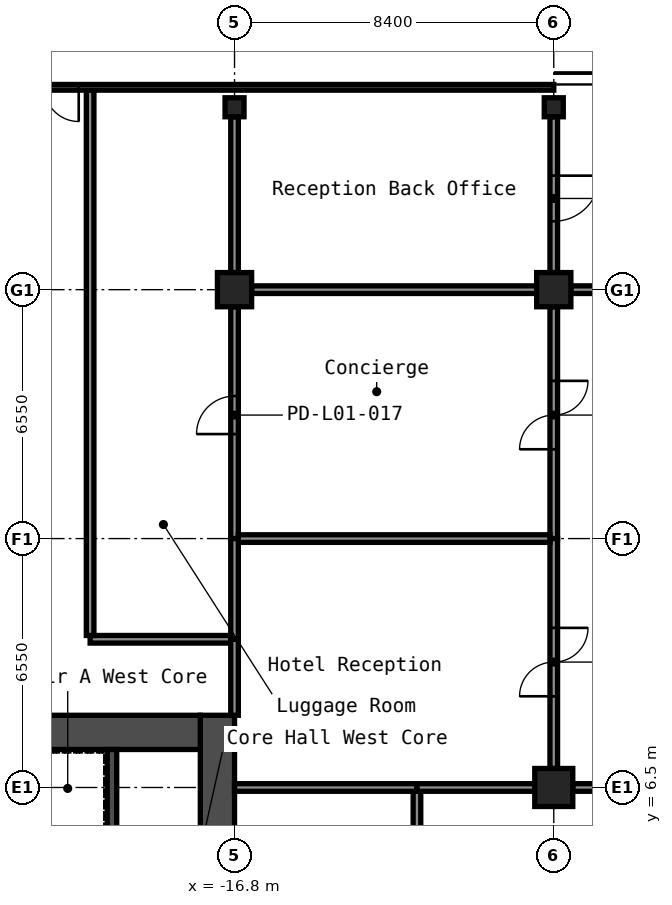
"""IFC4 building model, lengths in metres.
Left out: names, types, materials, properties, quantities, classifications, styles, units other than length and angle.
Written with IfcOpenShell. Run it as: python <this file> out.ifc"""

import sys

from ifc_helpers import new_model, si_unit, direction, frame, frame_2d, origin, origin_2d, place, context, subcontext, project, spatial, rectangle, hollow_rectangle, extrude, element, fill, save


model = new_model("IFC4")
c1 = context("Model", 3, precision=1e-05, world=origin(), true_north=direction((0.0, 1.0)))
c2 = subcontext(c1, "Body", "Model", "MODEL_VIEW")
j1 = project(units=[si_unit("LENGTHUNIT", "METRE"), si_unit("PLANEANGLEUNIT", "RADIAN")], contexts=[c1])
p1 = place(None, origin())
s1 = spatial("IfcSite", under=j1, at=p1, CompositionType="ELEMENT")
p2 = place(p1, origin())
s2 = spatial("IfcBuilding", under=s1, at=p2, CompositionType="ELEMENT")
p3 = place(p2, origin())
s3 = spatial("IfcBuildingStorey", under=s2, at=p3, CompositionType="ELEMENT", Elevation=0.0)
p4 = place(p3, frame((-16.8, 19.6, -0.3), z_axis=(0.0, 0.0, 1.0), x_axis=(1.0, 0.0, 0.0)))
e1 = element("IfcColumn", 1, at=p4, inside=s3, PredefinedType="COLUMN", context=c2, shape_type="SweptSolid", body=[
    extrude(hollow_rectangle(XDim=0.9, YDim=0.9, WallThickness=0.036, at=origin_2d()), origin(), (0.0, 0.0, 1.0), 8.9),
])
p5 = place(p3, frame((-8.4, 6.5, -0.3), z_axis=(0.0, 0.0, 1.0), x_axis=(1.0, 0.0, 0.0)))
e2 = element("IfcColumn", 2, at=p5, inside=s3, PredefinedType="COLUMN", context=c2, shape_type="SweptSolid", body=[
    extrude(hollow_rectangle(XDim=1.0, YDim=1.0, WallThickness=0.04, at=origin_2d()), origin(), (0.0, 0.0, 1.0), 8.9),
])
p6 = place(p3, frame((-8.4, 19.6, -0.3), z_axis=(0.0, 0.0, 1.0), x_axis=(1.0, 0.0, 0.0)))
e3 = element("IfcColumn", 3, at=p6, inside=s3, PredefinedType="COLUMN", context=c2, shape_type="SweptSolid", body=[
    extrude(hollow_rectangle(XDim=0.9, YDim=0.9, WallThickness=0.036, at=origin_2d()), origin(), (0.0, 0.0, 1.0), 8.9),
])
for number, where, z_axis, x_axis in (
    (4, (-16.8, 24.4, -0.3), (0.0, 0.0, 1.0), (1.0, 0.0, 0.0)),
    (5, (-8.4, 24.4, -0.3), (0.0, 0.0, 1.0), (1.0, 0.0, 0.0)),
):
    element("IfcColumn", number, at=place(p3, frame(where, z_axis=z_axis, x_axis=x_axis)), inside=s3, PredefinedType="COLUMN", context=c2, shape_type="SweptSolid", body=[
        extrude(hollow_rectangle(XDim=0.5, YDim=0.5, WallThickness=0.019, InnerFilletRadius=0.029, OuterFilletRadius=0.048, at=origin_2d()), origin(), (0.0, 0.0, 1.0), 8.9),
    ])
p7 = place(p3, frame((-17.25, -8.4, 0.0), z_axis=(0.0, 0.0, 1.0), x_axis=(0.0, 1.0, 0.0)))
e6 = element("IfcWall", 6, at=p7, inside=s3, PredefinedType="SHEAR", context=c2, shape_type="SweptSolid", body=[
    extrude(rectangle(XDim=16.8, YDim=0.9, at=frame_2d((8.4, 0.0))), origin(), (0.0, 0.0, 1.0), 8.6),
])
p8 = place(p7, frame((3.4, 0.0, 0.0)))
e7 = element("IfcOpeningElement", 7, at=p8, cuts=e6, PredefinedType="OPENING", context=c2, shape_type="SweptSolid", body=[
    extrude(rectangle(XDim=1.6, YDim=2.1, at=frame_2d((0.8, 1.05))), frame((0.0, 0.46, 0.0), z_axis=(0.0, -1.0, 0.0), x_axis=(1.0, 0.0, 0.0)), (0.0, 0.0, 1.0), 0.92),
])
p9 = place(p7, frame((9.6, 0.0, 0.0)))
e8 = element("IfcOpeningElement", 8, at=p9, cuts=e6, PredefinedType="OPENING", context=c2, shape_type="SweptSolid", body=[
    extrude(rectangle(XDim=1.6, YDim=2.1, at=frame_2d((0.8, 1.05))), frame((0.0, 0.46, 0.0), z_axis=(0.0, -1.0, 0.0), x_axis=(1.0, 0.0, 0.0)), (0.0, 0.0, 1.0), 0.92),
])
p10 = place(p7, frame((11.8, 0.0, 0.0)))
e9 = element("IfcOpeningElement", 9, at=p10, cuts=e6, PredefinedType="OPENING", context=c2, shape_type="SweptSolid", body=[
    extrude(rectangle(XDim=1.6, YDim=2.1, at=frame_2d((0.8, 1.05))), frame((0.0, 0.46, 0.0), z_axis=(0.0, -1.0, 0.0), x_axis=(1.0, 0.0, 0.0)), (0.0, 0.0, 1.0), 0.92),
])
p11 = place(p3, frame((-32.7, 7.95, 0.0), z_axis=(0.0, 0.0, 1.0), x_axis=(1.0, 0.0, 0.0)))
e10 = element("IfcWall", 10, at=p11, inside=s3, PredefinedType="SHEAR", context=c2, shape_type="SweptSolid", body=[
    extrude(rectangle(XDim=15.0, YDim=0.9, at=frame_2d((7.5, 0.0))), origin(), (0.0, 0.0, 1.0), 8.6),
])
p12 = place(p11, frame((3.4, 0.0, 0.0)))
e11 = element("IfcOpeningElement", 11, at=p12, cuts=e10, PredefinedType="OPENING", context=c2, shape_type="SweptSolid", body=[
    extrude(rectangle(XDim=1.2, YDim=2.1, at=frame_2d((0.6, 1.05))), frame((0.0, 0.46, 0.0), z_axis=(0.0, -1.0, 0.0), x_axis=(1.0, 0.0, 0.0)), (0.0, 0.0, 1.0), 0.92),
])
p13 = place(p11, frame((0.75, 0.0, 0.0)))
e12 = element("IfcOpeningElement", 12, at=p13, cuts=e10, PredefinedType="OPENING", context=c2, shape_type="SweptSolid", body=[
    extrude(rectangle(XDim=0.9, YDim=2.1, at=frame_2d((0.45, 1.05))), frame((0.0, 0.46, 0.0), z_axis=(0.0, -1.0, 0.0), x_axis=(1.0, 0.0, 0.0)), (0.0, 0.0, 1.0), 0.92),
])
p14 = place(p11, frame((7.05, 0.0, 0.0)))
e13 = element("IfcOpeningElement", 13, at=p14, cuts=e10, PredefinedType="OPENING", context=c2, shape_type="SweptSolid", body=[
    extrude(rectangle(XDim=1.2, YDim=2.1, at=frame_2d((0.6, 1.05))), frame((0.0, 0.46, 0.0), z_axis=(0.0, -1.0, 0.0), x_axis=(1.0, 0.0, 0.0)), (0.0, 0.0, 1.0), 0.92),
])
p15 = place(p3, frame((-20.025, 1.2, 0.0), z_axis=(0.0, 0.0, 1.0), x_axis=(0.0, 1.0, 0.0)))
e14 = element("IfcWall", 14, at=p15, inside=s3, PredefinedType="SHEAR", context=c2, shape_type="SweptSolid", body=[
    extrude(rectangle(XDim=6.3, YDim=0.25, at=frame_2d((3.15, 0.0))), origin(), (0.0, 0.0, 1.0), 8.6),
])
p16 = place(p3, frame((-8.4, 20.05, 0.0), z_axis=(0.0, 0.0, 1.0), x_axis=(0.0, 1.0, 0.0)))
e15 = element("IfcWall", 15, at=p16, inside=s3, PredefinedType="PARTITIONING", context=c2, shape_type="SweptSolid", body=[
    extrude(rectangle(XDim=4.1, YDim=0.2, at=frame_2d((2.05, 0.0))), origin(), (0.0, 0.0, 1.0), 8.6),
])
p17 = place(p16, frame((1.35, 0.0, 0.0)))
e16 = element("IfcOpeningElement", 16, at=p17, cuts=e15, PredefinedType="OPENING", context=c2, shape_type="SweptSolid", body=[
    extrude(rectangle(XDim=1.2, YDim=2.1, at=frame_2d((0.6, 1.05))), frame((0.0, 0.11, 0.0), z_axis=(0.0, -1.0, 0.0), x_axis=(1.0, 0.0, 0.0)), (0.0, 0.0, 1.0), 0.22),
])
p18 = place(p3, frame((-16.8, 20.05, 0.0), z_axis=(0.0, 0.0, 1.0), x_axis=(0.0, 1.0, 0.0)))
e17 = element("IfcWall", 17, at=p18, inside=s3, PredefinedType="PARTITIONING", context=c2, shape_type="SweptSolid", body=[
    extrude(rectangle(XDim=4.1, YDim=0.2, at=frame_2d((2.05, 0.0))), origin(), (0.0, 0.0, 1.0), 8.6),
])
p19 = place(p3, frame((-16.35, 19.6, 0.0), z_axis=(0.0, 0.0, 1.0), x_axis=(1.0, 0.0, 0.0)))
e18 = element("IfcWall", 18, at=p19, inside=s3, PredefinedType="PARTITIONING", context=c2, shape_type="SweptSolid", body=[
    extrude(rectangle(XDim=7.5, YDim=0.2, at=frame_2d((3.75, 0.0))), origin(), (0.0, 0.0, 1.0), 8.6),
])
p20 = place(p3, frame((-16.8, 13.05, 0.0), z_axis=(0.0, 0.0, 1.0), x_axis=(0.0, 1.0, 0.0)))
e19 = element("IfcWall", 19, at=p20, inside=s3, PredefinedType="PARTITIONING", context=c2, shape_type="SweptSolid", body=[
    extrude(rectangle(XDim=6.1, YDim=0.2, at=frame_2d((3.05, 0.0))), origin(), (0.0, 0.0, 1.0), 8.6),
])
p21 = place(p20, frame((2.75, 0.0, 0.0)))
e20 = element("IfcOpeningElement", 20, at=p21, cuts=e19, PredefinedType="OPENING", context=c2, shape_type="SweptSolid", body=[
    extrude(rectangle(XDim=1.0, YDim=2.1, at=frame_2d((0.5, 1.05))), frame((0.0, 0.11, 0.0), z_axis=(0.0, -1.0, 0.0), x_axis=(1.0, 0.0, 0.0)), (0.0, 0.0, 1.0), 0.22),
])
p22 = place(p3, frame((-12.0, 6.4, 0.0), z_axis=(0.0, 0.0, 1.0), x_axis=(0.0, -1.0, 0.0)))
e21 = element("IfcWall", 21, at=p22, inside=s3, PredefinedType="PARTITIONING", context=c2, shape_type="SweptSolid", body=[
    extrude(rectangle(XDim=12.8, YDim=0.2, at=frame_2d((6.4, 0.0))), origin(), (0.0, 0.0, 1.0), 8.6),
])
p23 = place(p22, frame((5.2, 0.0, 0.0)))
e22 = element("IfcOpeningElement", 22, at=p23, cuts=e21, PredefinedType="OPENING", context=c2, shape_type="SweptSolid", body=[
    extrude(rectangle(XDim=2.4, YDim=2.1, at=frame_2d((1.2, 1.05))), frame((0.0, 0.11, 0.0), z_axis=(0.0, -1.0, 0.0), x_axis=(1.0, 0.0, 0.0)), (0.0, 0.0, 1.0), 0.22),
])
p24 = place(p3, frame((-16.8, 6.5, 0.0), z_axis=(0.0, 0.0, 1.0), x_axis=(1.0, 0.0, 0.0)))
e23 = element("IfcWall", 23, at=p24, inside=s3, PredefinedType="PARTITIONING", context=c2, shape_type="SweptSolid", body=[
    extrude(rectangle(XDim=4.8, YDim=0.2, at=frame_2d((2.4, 0.0))), origin(), (0.0, 0.0, 1.0), 8.6),
])
p25 = place(p3, frame((-7.9, 6.5, 0.0), z_axis=(0.0, 0.0, 1.0), x_axis=(1.0, 0.0, 0.0)))
e24 = element("IfcWall", 24, at=p25, inside=s3, PredefinedType="PARTITIONING", context=c2, shape_type="SweptSolid", body=[
    extrude(rectangle(XDim=7.4, YDim=0.2, at=frame_2d((3.7, 0.0))), origin(), (0.0, 0.0, 1.0), 8.6),
])
p26 = place(p25, frame((2.5, 0.0, 0.0)))
e25 = element("IfcOpeningElement", 25, at=p26, cuts=e24, PredefinedType="OPENING", context=c2, shape_type="SweptSolid", body=[
    extrude(rectangle(XDim=2.4, YDim=2.1, at=frame_2d((1.2, 1.05))), frame((0.0, 0.11, 0.0), z_axis=(0.0, -1.0, 0.0), x_axis=(1.0, 0.0, 0.0)), (0.0, 0.0, 1.0), 0.22),
])
p27 = place(p3, frame((-12.0, 6.5, 0.0), z_axis=(0.0, 0.0, 1.0), x_axis=(1.0, 0.0, 0.0)))
e26 = element("IfcWall", 26, at=p27, inside=s3, PredefinedType="PARTITIONING", context=c2, shape_type="SweptSolid", body=[
    extrude(rectangle(XDim=3.1, YDim=0.2, at=frame_2d((1.55, 0.0))), origin(), (0.0, 0.0, 1.0), 8.6),
])
p28 = place(p3, frame((-7.95, 19.6, 0.0), z_axis=(0.0, 0.0, 1.0), x_axis=(1.0, 0.0, 0.0)))
e27 = element("IfcWall", 27, at=p28, inside=s3, PredefinedType="PARTITIONING", context=c2, shape_type="SweptSolid", body=[
    extrude(rectangle(XDim=7.5, YDim=0.2, at=frame_2d((3.75, 0.0))), origin(), (0.0, 0.0, 1.0), 8.6),
])
p29 = place(p28, frame((2.55, 0.0, 0.0)))
e28 = element("IfcOpeningElement", 28, at=p29, cuts=e27, PredefinedType="OPENING", context=c2, shape_type="SweptSolid", body=[
    extrude(rectangle(XDim=2.4, YDim=2.1, at=frame_2d((1.2, 1.05))), frame((0.0, 0.11, 0.0), z_axis=(0.0, -1.0, 0.0), x_axis=(1.0, 0.0, 0.0)), (0.0, 0.0, 1.0), 0.22),
])
p30 = place(p3, frame((-8.4, 13.05, 0.0), z_axis=(0.0, 0.0, 1.0), x_axis=(0.0, 1.0, 0.0)))
e29 = element("IfcWall", 29, at=p30, inside=s3, PredefinedType="PARTITIONING", context=c2, shape_type="SweptSolid", body=[
    extrude(rectangle(XDim=6.1, YDim=0.2, at=frame_2d((3.05, 0.0))), origin(), (0.0, 0.0, 1.0), 8.6),
])
p31 = place(p30, frame((2.35, 0.0, 0.0)))
e30 = element("IfcOpeningElement", 30, at=p31, cuts=e29, PredefinedType="OPENING", context=c2, shape_type="SweptSolid", body=[
    extrude(rectangle(XDim=1.8, YDim=2.1, at=frame_2d((0.9, 1.05))), frame((0.0, 0.11, 0.0), z_axis=(0.0, -1.0, 0.0), x_axis=(1.0, 0.0, 0.0)), (0.0, 0.0, 1.0), 0.22),
])
p32 = place(p3, frame((-8.4, 7.0, 0.0), z_axis=(0.0, 0.0, 1.0), x_axis=(0.0, 1.0, 0.0)))
e31 = element("IfcWall", 31, at=p32, inside=s3, PredefinedType="PARTITIONING", context=c2, shape_type="SweptSolid", body=[
    extrude(rectangle(XDim=6.05, YDim=0.2, at=frame_2d((3.025, 0.0))), origin(), (0.0, 0.0, 1.0), 8.6),
])
p33 = place(p32, frame((1.9, 0.0, 0.0)))
e32 = element("IfcOpeningElement", 32, at=p33, cuts=e31, PredefinedType="OPENING", context=c2, shape_type="SweptSolid", body=[
    extrude(rectangle(XDim=1.8, YDim=2.1, at=frame_2d((0.9, 1.05))), frame((0.0, 0.11, 0.0), z_axis=(0.0, -1.0, 0.0), x_axis=(1.0, 0.0, 0.0)), (0.0, 0.0, 1.0), 0.22),
])
p34 = place(p3, frame((-16.7, 13.05, 0.0), z_axis=(0.0, 0.0, 1.0), x_axis=(1.0, 0.0, 0.0)))
e33 = element("IfcWall", 33, at=p34, inside=s3, PredefinedType="PARTITIONING", context=c2, shape_type="SweptSolid", body=[
    extrude(rectangle(XDim=8.2, YDim=0.2, at=frame_2d((4.1, 0.0))), origin(), (0.0, 0.0, 1.0), 8.6),
])
p35 = place(p3, frame((-16.8, 10.4, 0.0), z_axis=(0.0, 0.0, 1.0), x_axis=(0.0, 1.0, 0.0)))
e34 = element("IfcWall", 34, at=p35, inside=s3, PredefinedType="PARTITIONING", context=c2, shape_type="SweptSolid", body=[
    extrude(rectangle(XDim=2.65, YDim=0.2, at=frame_2d((1.325, 0.0))), origin(), (0.0, 0.0, 1.0), 8.6),
])
p36 = place(p3, frame((-20.6, 10.4, 0.0), z_axis=(0.0, 0.0, 1.0), x_axis=(1.0, 0.0, 0.0)))
e35 = element("IfcWall", 35, at=p36, inside=s3, PredefinedType="PARTITIONING", context=c2, shape_type="SweptSolid", body=[
    extrude(rectangle(XDim=3.7, YDim=0.2, at=frame_2d((1.85, 0.0))), origin(), (0.0, 0.0, 1.0), 8.6),
])
p37 = place(p3, frame((-20.6, 24.85, 0.0), z_axis=(0.0, 0.0, 1.0), x_axis=(0.0, -1.0, 0.0)))
e36 = element("IfcWall", 36, at=p37, inside=s3, PredefinedType="PARTITIONING", context=c2, shape_type="SweptSolid", body=[
    extrude(rectangle(XDim=14.35, YDim=0.2, at=frame_2d((7.175, 0.0))), origin(), (0.0, 0.0, 1.0), 8.6),
])
p38 = place(p3, frame((-16.8, 10.4, 0.0), z_axis=(0.0, 0.0, 1.0), x_axis=(0.0, -1.0, 0.0)))
e37 = element("IfcWall", 37, at=p38, inside=s3, PredefinedType="PARTITIONING", context=c2, shape_type="SweptSolid", body=[
    extrude(rectangle(XDim=2.0, YDim=0.2, at=frame_2d((1.0, 0.0))), origin(), (0.0, 0.0, 1.0), 8.6),
])
p39 = place(p3, frame((-23.6, 24.925, 0.0), z_axis=(0.0, 0.0, 1.0), x_axis=(1.0, 0.0, 0.0)))
e38 = element("IfcWall", 38, at=p39, inside=s3, PredefinedType="STANDARD", context=c2, shape_type="SweptSolid", body=[
    extrude(rectangle(XDim=15.2, YDim=0.15, at=frame_2d((7.6, 0.0))), origin(), (0.0, 0.0, 1.0), 8.6),
])
p40 = place(p39, frame((0.9, 0.0, 0.0)))
e39 = element("IfcOpeningElement", 39, at=p40, cuts=e38, PredefinedType="OPENING", context=c2, shape_type="SweptSolid", body=[
    extrude(rectangle(XDim=1.8, YDim=2.1, at=frame_2d((0.9, 1.05))), frame((0.0, 0.085, 0.0), z_axis=(0.0, -1.0, 0.0), x_axis=(1.0, 0.0, 0.0)), (0.0, 0.0, 1.0), 0.17),
])
p41 = place(p33, origin())
e40 = element("IfcDoor", 40, at=p41, inside=s3, OperationType="DOUBLE_DOOR_DOUBLE_SWING", PredefinedType="DOOR", context=c2, shape_type="SweptSolid", body=[
    extrude(rectangle(XDim=1.8, YDim=2.1, at=frame_2d((0.9, 1.05))), frame((0.0, 0.025, 0.0), z_axis=(0.0, -1.0, 0.0), x_axis=(1.0, 0.0, 0.0)), (0.0, 0.0, 1.0), 0.05),
])
fill(e32, e40)
p42 = place(p31, origin())
e41 = element("IfcDoor", 41, at=p42, inside=s3, OperationType="DOUBLE_DOOR_DOUBLE_SWING", PredefinedType="DOOR", context=c2, shape_type="SweptSolid", body=[
    extrude(rectangle(XDim=1.8, YDim=2.1, at=frame_2d((0.9, 1.05))), frame((0.0, 0.025, 0.0), z_axis=(0.0, -1.0, 0.0), x_axis=(1.0, 0.0, 0.0)), (0.0, 0.0, 1.0), 0.05),
])
fill(e30, e41)
p43 = place(p17, origin())
e42 = element("IfcDoor", 42, at=p43, inside=s3, OperationType="SINGLE_SWING_RIGHT", PredefinedType="DOOR", context=c2, shape_type="SweptSolid", body=[
    extrude(rectangle(XDim=1.2, YDim=2.1, at=frame_2d((0.6, 1.05))), frame((0.0, 0.025, 0.0), z_axis=(0.0, -1.0, 0.0), x_axis=(1.0, 0.0, 0.0)), (0.0, 0.0, 1.0), 0.05),
])
fill(e16, e42)
p44 = place(p21, origin())
e43 = element("IfcDoor", 43, at=p44, inside=s3, OperationType="SINGLE_SWING_RIGHT", PredefinedType="DOOR", context=c2, shape_type="SweptSolid", body=[
    extrude(rectangle(XDim=1.0, YDim=2.1, at=frame_2d((0.5, 1.05))), frame((0.0, 0.025, 0.0), z_axis=(0.0, -1.0, 0.0), x_axis=(1.0, 0.0, 0.0)), (0.0, 0.0, 1.0), 0.05),
])
fill(e20, e43)
p45 = place(p40, origin())
e44 = element("IfcDoor", 44, at=p45, inside=s3, OperationType="DOUBLE_DOOR_SINGLE_SWING", PredefinedType="DOOR", context=c2, shape_type="SweptSolid", body=[
    extrude(rectangle(XDim=1.8, YDim=2.1, at=frame_2d((0.9, 1.05))), frame((0.0, 0.025, 0.0), z_axis=(0.0, -1.0, 0.0), x_axis=(1.0, 0.0, 0.0)), (0.0, 0.0, 1.0), 0.05),
])
fill(e39, e44)
save(model, sys.argv[1])
